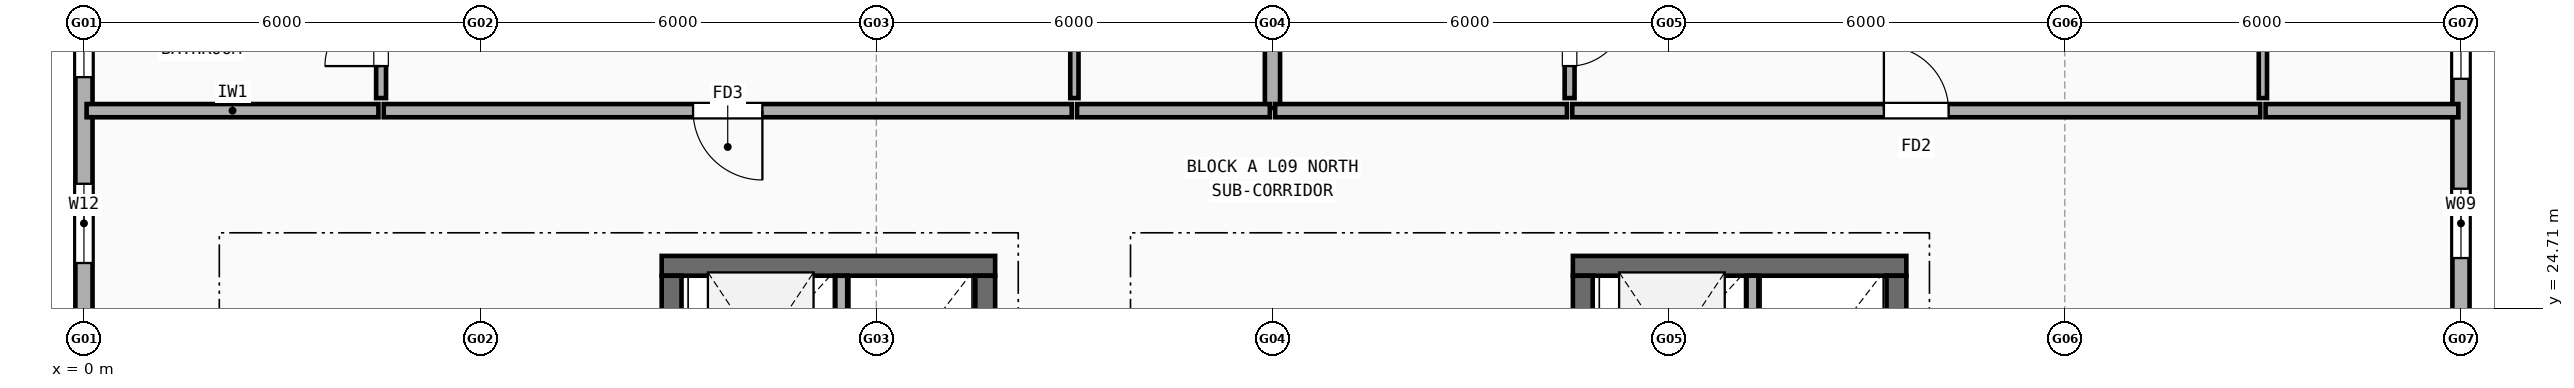
"""IFC4 building model, lengths in metres.
Left out: names, types, materials, properties, quantities, classifications, styles, units other than length and angle.
Written with IfcOpenShell. Run it as: python <this file> out.ifc"""

import sys

from ifc_helpers import new_model, si_unit, direction, frame, frame_2d, origin, place, context, subcontext, project, spatial, rectangle, extrude, element, fill, save


model = new_model("IFC4")
c1 = context("Model", 3, precision=1e-05, world=origin(), true_north=direction((0.0, 1.0)))
c2 = subcontext(c1, "Body", "Model", "MODEL_VIEW")
j1 = project(units=[si_unit("LENGTHUNIT", "METRE"), si_unit("PLANEANGLEUNIT", "RADIAN")], contexts=[c1])
p1 = place(None, origin())
s1 = spatial("IfcSite", under=j1, at=p1, CompositionType="ELEMENT")
p2 = place(p1, origin())
s2 = spatial("IfcBuilding", under=s1, at=p2, CompositionType="ELEMENT")
p3 = place(p2, frame((0.0, 0.0, 30.1)))
s3 = spatial("IfcBuildingStorey", under=s2, at=p3, CompositionType="ELEMENT", Elevation=30.1)
p4 = place(p3, frame((36.0, 24.325, 0.0), z_axis=(0.0, 0.0, 1.0), x_axis=(0.0, 1.0, 0.0)))
e1 = element("IfcWall", 1, at=p4, inside=s3, PredefinedType="STANDARD", context=c2, shape_type="SweptSolid", body=[
    extrude(rectangle(XDim=5.35, YDim=0.26, at=frame_2d((2.675, 0.0))), origin(), (0.0, 0.0, 1.0), 2.467),
])
p5 = place(p4, frame((1.143, 0.0, 0.9)))
e2 = element("IfcOpeningElement", 2, at=p5, cuts=e1, PredefinedType="OPENING", context=c2, shape_type="SweptSolid", body=[
    extrude(rectangle(XDim=1.05, YDim=1.35, at=frame_2d((0.525, 0.675))), frame((0.0, 0.14, 0.0), z_axis=(0.0, -1.0, 0.0), x_axis=(1.0, 0.0, 0.0)), (0.0, 0.0, 1.0), 0.28),
])
p6 = place(p4, frame((3.857, 0.0, 0.9)))
e3 = element("IfcOpeningElement", 3, at=p6, cuts=e1, PredefinedType="OPENING", context=c2, shape_type="SweptSolid", body=[
    extrude(rectangle(XDim=1.05, YDim=1.35, at=frame_2d((0.525, 0.675))), frame((0.0, 0.14, 0.0), z_axis=(0.0, -1.0, 0.0), x_axis=(1.0, 0.0, 0.0)), (0.0, 0.0, 1.0), 0.28),
])
p7 = place(p3, frame((0.0, 29.675, 0.0), z_axis=(0.0, 0.0, 1.0), x_axis=(0.0, -1.0, 0.0)))
e4 = element("IfcWall", 4, at=p7, inside=s3, PredefinedType="STANDARD", context=c2, shape_type="SweptSolid", body=[
    extrude(rectangle(XDim=5.35, YDim=0.26, at=frame_2d((2.675, 0.0))), origin(), (0.0, 0.0, 1.0), 2.467),
])
p8 = place(p7, frame((0.468, 0.0, 0.9)))
e5 = element("IfcOpeningElement", 5, at=p8, cuts=e4, PredefinedType="OPENING", context=c2, shape_type="SweptSolid", body=[
    extrude(rectangle(XDim=1.0, YDim=1.4, at=frame_2d((0.5, 0.7))), frame((0.0, 0.14, 0.0), z_axis=(0.0, -1.0, 0.0), x_axis=(1.0, 0.0, 0.0)), (0.0, 0.0, 1.0), 0.28),
])
p9 = place(p7, frame((3.083, 0.0, 0.9)))
e6 = element("IfcOpeningElement", 6, at=p9, cuts=e4, PredefinedType="OPENING", context=c2, shape_type="SweptSolid", body=[
    extrude(rectangle(XDim=1.2, YDim=1.35, at=frame_2d((0.6, 0.675))), frame((0.0, 0.14, 0.0), z_axis=(0.0, -1.0, 0.0), x_axis=(1.0, 0.0, 0.0)), (0.0, 0.0, 1.0), 0.28),
])
p10 = place(p3, frame((13.8, 25.35, 0.0), z_axis=(0.0, 0.0, 1.0), x_axis=(-1.0, 0.0, 0.0)))
e7 = element("IfcWall", 7, at=p10, inside=s3, PredefinedType="SHEAR", context=c2, shape_type="SweptSolid", body=[
    extrude(rectangle(XDim=5.05, YDim=0.3, at=frame_2d((2.525, 0.0))), origin(), (0.0, 0.0, 1.0), 2.985),
])
p11 = place(p3, frame((13.65, 18.75, 0.0), z_axis=(0.0, 0.0, 1.0), x_axis=(0.0, 1.0, 0.0)))
e8 = element("IfcWall", 8, at=p11, inside=s3, PredefinedType="SHEAR", context=c2, shape_type="SweptSolid", body=[
    extrude(rectangle(XDim=6.45, YDim=0.3, at=frame_2d((3.225, 0.0))), origin(), (0.0, 0.0, 1.0), 2.985),
])
p12 = place(p3, frame((8.9, 21.75, 0.0), z_axis=(0.0, 0.0, 1.0), x_axis=(0.0, 1.0, 0.0)))
e9 = element("IfcWall", 9, at=p12, inside=s3, PredefinedType="SHEAR", context=c2, shape_type="SweptSolid", body=[
    extrude(rectangle(XDim=3.45, YDim=0.3, at=frame_2d((1.725, 0.0))), origin(), (0.0, 0.0, 1.0), 2.985),
])
p13 = place(p3, frame((11.47, 22.94, 0.0), z_axis=(0.0, 0.0, 1.0), x_axis=(0.0, 1.0, 0.0)))
e10 = element("IfcWall", 10, at=p13, inside=s3, PredefinedType="SOLIDWALL", context=c2, shape_type="SweptSolid", body=[
    extrude(rectangle(XDim=2.26, YDim=0.18, at=frame_2d((1.13, 0.0))), origin(), (0.0, 0.0, 1.0), 2.985),
])
p14 = place(p3, frame((27.6, 25.35, 0.0), z_axis=(0.0, 0.0, 1.0), x_axis=(-1.0, 0.0, 0.0)))
e11 = element("IfcWall", 11, at=p14, inside=s3, PredefinedType="SHEAR", context=c2, shape_type="SweptSolid", body=[
    extrude(rectangle(XDim=5.05, YDim=0.3, at=frame_2d((2.525, 0.0))), origin(), (0.0, 0.0, 1.0), 2.985),
])
p15 = place(p3, frame((27.45, 18.75, 0.0), z_axis=(0.0, 0.0, 1.0), x_axis=(0.0, 1.0, 0.0)))
e12 = element("IfcWall", 12, at=p15, inside=s3, PredefinedType="SHEAR", context=c2, shape_type="SweptSolid", body=[
    extrude(rectangle(XDim=6.45, YDim=0.3, at=frame_2d((3.225, 0.0))), origin(), (0.0, 0.0, 1.0), 2.985),
])
p16 = place(p3, frame((22.7, 21.75, 0.0), z_axis=(0.0, 0.0, 1.0), x_axis=(0.0, 1.0, 0.0)))
e13 = element("IfcWall", 13, at=p16, inside=s3, PredefinedType="SHEAR", context=c2, shape_type="SweptSolid", body=[
    extrude(rectangle(XDim=3.45, YDim=0.3, at=frame_2d((1.725, 0.0))), origin(), (0.0, 0.0, 1.0), 2.985),
])
p17 = place(p3, frame((25.27, 22.94, 0.0), z_axis=(0.0, 0.0, 1.0), x_axis=(0.0, 1.0, 0.0)))
e14 = element("IfcWall", 14, at=p17, inside=s3, PredefinedType="SOLIDWALL", context=c2, shape_type="SweptSolid", body=[
    extrude(rectangle(XDim=2.26, YDim=0.18, at=frame_2d((1.13, 0.0))), origin(), (0.0, 0.0, 1.0), 2.985),
])
p18 = place(p3, frame((18.0, 27.74, 0.0), z_axis=(0.0, 0.0, 1.0), x_axis=(0.0, 1.0, 0.0)))
e15 = element("IfcWall", 15, at=p18, inside=s3, PredefinedType="SOLIDWALL", context=c2, shape_type="SweptSolid", body=[
    extrude(rectangle(XDim=7.87, YDim=0.23, at=frame_2d((3.935, 0.0))), origin(), (0.0, 0.0, 1.0), 2.548),
])
p19 = place(p3, frame((0.04, 27.7, 0.0), z_axis=(0.0, 0.0, 1.0), x_axis=(1.0, 0.0, 0.0)))
e16 = element("IfcWall", 16, at=p19, inside=s3, PredefinedType="SOLIDWALL", context=c2, shape_type="SweptSolid", body=[
    extrude(rectangle(XDim=4.42, YDim=0.2, at=frame_2d((2.21, 0.0))), origin(), (0.0, 0.0, 1.0), 2.467),
])
p20 = place(p3, frame((4.54, 27.7, 0.0), z_axis=(0.0, 0.0, 1.0), x_axis=(1.0, 0.0, 0.0)))
e17 = element("IfcWall", 17, at=p20, inside=s3, PredefinedType="SOLIDWALL", context=c2, shape_type="SweptSolid", body=[
    extrude(rectangle(XDim=10.42, YDim=0.2, at=frame_2d((5.21, 0.0))), origin(), (0.0, 0.0, 1.0), 2.508),
])
p21 = place(p20, frame((4.685, 0.0, 0.0)))
e18 = element("IfcOpeningElement", 18, at=p21, cuts=e17, PredefinedType="OPENING", context=c2, shape_type="SweptSolid", body=[
    extrude(rectangle(XDim=1.05, YDim=2.15, at=frame_2d((0.525, 1.075))), frame((0.0, 0.11, 0.0), z_axis=(0.0, -1.0, 0.0), x_axis=(1.0, 0.0, 0.0)), (0.0, 0.0, 1.0), 0.22),
])
p22 = place(p3, frame((4.5, 27.89, 0.0), z_axis=(0.0, 0.0, 1.0), x_axis=(0.0, 1.0, 0.0)))
e19 = element("IfcWall", 19, at=p22, inside=s3, PredefinedType="PARTITIONING", context=c2, shape_type="SweptSolid", body=[
    extrude(rectangle(XDim=1.82, YDim=0.15, at=frame_2d((0.91, 0.0))), origin(), (0.0, 0.0, 1.0), 2.985),
])
p23 = place(p22, frame((0.485, 0.0, 0.0)))
e20 = element("IfcOpeningElement", 20, at=p23, cuts=e19, PredefinedType="OPENING", context=c2, shape_type="SweptSolid", body=[
    extrude(rectangle(XDim=0.85, YDim=2.1, at=frame_2d((0.425, 1.05))), frame((0.0, 0.085, 0.0), z_axis=(0.0, -1.0, 0.0), x_axis=(1.0, 0.0, 0.0)), (0.0, 0.0, 1.0), 0.17),
])
p24 = place(p3, frame((15.04, 27.7, 0.0), z_axis=(0.0, 0.0, 1.0), x_axis=(1.0, 0.0, 0.0)))
e21 = element("IfcWall", 21, at=p24, inside=s3, PredefinedType="SOLIDWALL", context=c2, shape_type="SweptSolid", body=[
    extrude(rectangle(XDim=2.92, YDim=0.2, at=frame_2d((1.46, 0.0))), origin(), (0.0, 0.0, 1.0), 2.985),
])
p25 = place(p3, frame((15.0, 27.89, 0.0), z_axis=(0.0, 0.0, 1.0), x_axis=(0.0, 1.0, 0.0)))
e22 = element("IfcWall", 22, at=p25, inside=s3, PredefinedType="PARTITIONING", context=c2, shape_type="SweptSolid", body=[
    extrude(rectangle(XDim=7.92, YDim=0.125, at=frame_2d((3.96, 0.0))), origin(), (0.0, 0.0, 1.0), 2.467),
])
p26 = place(p25, frame((3.65, 0.0, 0.0)))
e23 = element("IfcOpeningElement", 23, at=p26, cuts=e22, PredefinedType="OPENING", context=c2, shape_type="SweptSolid", body=[
    extrude(rectangle(XDim=0.9, YDim=2.1, at=frame_2d((0.45, 1.05))), frame((0.0, 0.073, 0.0), z_axis=(0.0, -1.0, 0.0), x_axis=(1.0, 0.0, 0.0)), (0.0, 0.0, 1.0), 0.145),
])
p27 = place(p3, frame((18.04, 27.7, 0.0), z_axis=(0.0, 0.0, 1.0), x_axis=(1.0, 0.0, 0.0)))
e24 = element("IfcWall", 24, at=p27, inside=s3, PredefinedType="SOLIDWALL", context=c2, shape_type="SweptSolid", body=[
    extrude(rectangle(XDim=4.42, YDim=0.2, at=frame_2d((2.21, 0.0))), origin(), (0.0, 0.0, 1.0), 2.985),
])
p28 = place(p3, frame((22.54, 27.7, 0.0), z_axis=(0.0, 0.0, 1.0), x_axis=(1.0, 0.0, 0.0)))
e25 = element("IfcWall", 25, at=p28, inside=s3, PredefinedType="SOLIDWALL", context=c2, shape_type="SweptSolid", body=[
    extrude(rectangle(XDim=10.42, YDim=0.2, at=frame_2d((5.21, 0.0))), origin(), (0.0, 0.0, 1.0), 2.467),
])
p29 = place(p28, frame((4.72, 0.0, 0.0)))
e26 = element("IfcOpeningElement", 26, at=p29, cuts=e25, PredefinedType="OPENING", context=c2, shape_type="SweptSolid", body=[
    extrude(rectangle(XDim=0.98, YDim=2.15, at=frame_2d((0.49, 1.075))), frame((0.0, 0.11, 0.0), z_axis=(0.0, -1.0, 0.0), x_axis=(1.0, 0.0, 0.0)), (0.0, 0.0, 1.0), 0.22),
])
p30 = place(p3, frame((22.5, 27.89, 0.0), z_axis=(0.0, 0.0, 1.0), x_axis=(0.0, 1.0, 0.0)))
e27 = element("IfcWall", 27, at=p30, inside=s3, PredefinedType="PARTITIONING", context=c2, shape_type="SweptSolid", body=[
    extrude(rectangle(XDim=1.82, YDim=0.15, at=frame_2d((0.91, 0.0))), origin(), (0.0, 0.0, 1.0), 2.985),
])
p31 = place(p30, frame((0.485, 0.0, 0.0)))
e28 = element("IfcOpeningElement", 28, at=p31, cuts=e27, PredefinedType="OPENING", context=c2, shape_type="SweptSolid", body=[
    extrude(rectangle(XDim=0.85, YDim=2.1, at=frame_2d((0.425, 1.05))), frame((0.0, 0.085, 0.0), z_axis=(0.0, -1.0, 0.0), x_axis=(1.0, 0.0, 0.0)), (0.0, 0.0, 1.0), 0.17),
])
p32 = place(p3, frame((33.04, 27.7, 0.0), z_axis=(0.0, 0.0, 1.0), x_axis=(1.0, 0.0, 0.0)))
e29 = element("IfcWall", 29, at=p32, inside=s3, PredefinedType="SOLIDWALL", context=c2, shape_type="SweptSolid", body=[
    extrude(rectangle(XDim=2.92, YDim=0.2, at=frame_2d((1.46, 0.0))), origin(), (0.0, 0.0, 1.0), 2.467),
])
p33 = place(p3, frame((33.0, 27.89, 0.0), z_axis=(0.0, 0.0, 1.0), x_axis=(0.0, 1.0, 0.0)))
e30 = element("IfcWall", 30, at=p33, inside=s3, PredefinedType="PARTITIONING", context=c2, shape_type="SweptSolid", body=[
    extrude(rectangle(XDim=7.92, YDim=0.125, at=frame_2d((3.96, 0.0))), origin(), (0.0, 0.0, 1.0), 2.467),
])
p34 = place(p33, frame((3.65, 0.0, 0.0)))
e31 = element("IfcOpeningElement", 31, at=p34, cuts=e30, PredefinedType="OPENING", context=c2, shape_type="SweptSolid", body=[
    extrude(rectangle(XDim=0.88, YDim=2.1, at=frame_2d((0.44, 1.05))), frame((0.0, 0.073, 0.0), z_axis=(0.0, -1.0, 0.0), x_axis=(1.0, 0.0, 0.0)), (0.0, 0.0, 1.0), 0.145),
])
p35 = place(p5, origin())
e32 = element("IfcWindow", 32, at=p35, inside=s3, PartitioningType="SINGLE_PANEL", PredefinedType="WINDOW", context=c2, shape_type="SweptSolid", body=[
    extrude(rectangle(XDim=1.05, YDim=1.35, at=frame_2d((0.525, 0.675))), frame((0.0, 0.03, 0.0), z_axis=(0.0, -1.0, 0.0), x_axis=(1.0, 0.0, 0.0)), (0.0, 0.0, 1.0), 0.06),
])
fill(e2, e32)
p36 = place(p6, origin())
e33 = element("IfcWindow", 33, at=p36, inside=s3, PartitioningType="SINGLE_PANEL", PredefinedType="WINDOW", context=c2, shape_type="SweptSolid", body=[
    extrude(rectangle(XDim=1.05, YDim=1.35, at=frame_2d((0.525, 0.675))), frame((0.0, 0.03, 0.0), z_axis=(0.0, -1.0, 0.0), x_axis=(1.0, 0.0, 0.0)), (0.0, 0.0, 1.0), 0.06),
])
fill(e3, e33)
p37 = place(p8, origin())
e34 = element("IfcWindow", 34, at=p37, inside=s3, PartitioningType="SINGLE_PANEL", PredefinedType="WINDOW", context=c2, shape_type="SweptSolid", body=[
    extrude(rectangle(XDim=1.0, YDim=1.4, at=frame_2d((0.5, 0.7))), frame((0.0, 0.03, 0.0), z_axis=(0.0, -1.0, 0.0), x_axis=(1.0, 0.0, 0.0)), (0.0, 0.0, 1.0), 0.06),
])
fill(e5, e34)
p38 = place(p9, origin())
e35 = element("IfcWindow", 35, at=p38, inside=s3, PartitioningType="SINGLE_PANEL", PredefinedType="WINDOW", context=c2, shape_type="SweptSolid", body=[
    extrude(rectangle(XDim=1.2, YDim=1.35, at=frame_2d((0.6, 0.675))), frame((0.0, 0.03, 0.0), z_axis=(0.0, -1.0, 0.0), x_axis=(1.0, 0.0, 0.0)), (0.0, 0.0, 1.0), 0.06),
])
fill(e6, e35)
p39 = place(p21, origin())
e36 = element("IfcDoor", 36, at=p39, inside=s3, OperationType="SINGLE_SWING_RIGHT", PredefinedType="DOOR", context=c2, shape_type="SweptSolid", body=[
    extrude(rectangle(XDim=1.05, YDim=2.15, at=frame_2d((0.525, 1.075))), frame((0.0, 0.025, 0.0), z_axis=(0.0, -1.0, 0.0), x_axis=(1.0, 0.0, 0.0)), (0.0, 0.0, 1.0), 0.05),
])
fill(e18, e36)
p40 = place(p23, origin())
e37 = element("IfcDoor", 37, at=p40, inside=s3, OperationType="SINGLE_SWING_LEFT", PredefinedType="DOOR", context=c2, shape_type="SweptSolid", body=[
    extrude(rectangle(XDim=0.85, YDim=2.1, at=frame_2d((0.425, 1.05))), frame((0.0, 0.025, 0.0), z_axis=(0.0, -1.0, 0.0), x_axis=(1.0, 0.0, 0.0)), (0.0, 0.0, 1.0), 0.05),
])
fill(e20, e37)
p41 = place(p29, origin())
e38 = element("IfcDoor", 38, at=p41, inside=s3, OperationType="SINGLE_SWING_LEFT", PredefinedType="DOOR", context=c2, shape_type="SweptSolid", body=[
    extrude(rectangle(XDim=0.98, YDim=2.15, at=frame_2d((0.49, 1.075))), frame((0.0, 0.025, 0.0), z_axis=(0.0, -1.0, 0.0), x_axis=(1.0, 0.0, 0.0)), (0.0, 0.0, 1.0), 0.05),
])
fill(e26, e38)
p42 = place(p31, origin())
e39 = element("IfcDoor", 39, at=p42, inside=s3, OperationType="SINGLE_SWING_RIGHT", PredefinedType="DOOR", context=c2, shape_type="SweptSolid", body=[
    extrude(rectangle(XDim=0.85, YDim=2.1, at=frame_2d((0.425, 1.05))), frame((0.0, 0.025, 0.0), z_axis=(0.0, -1.0, 0.0), x_axis=(1.0, 0.0, 0.0)), (0.0, 0.0, 1.0), 0.05),
])
fill(e28, e39)
save(model, sys.argv[1])
